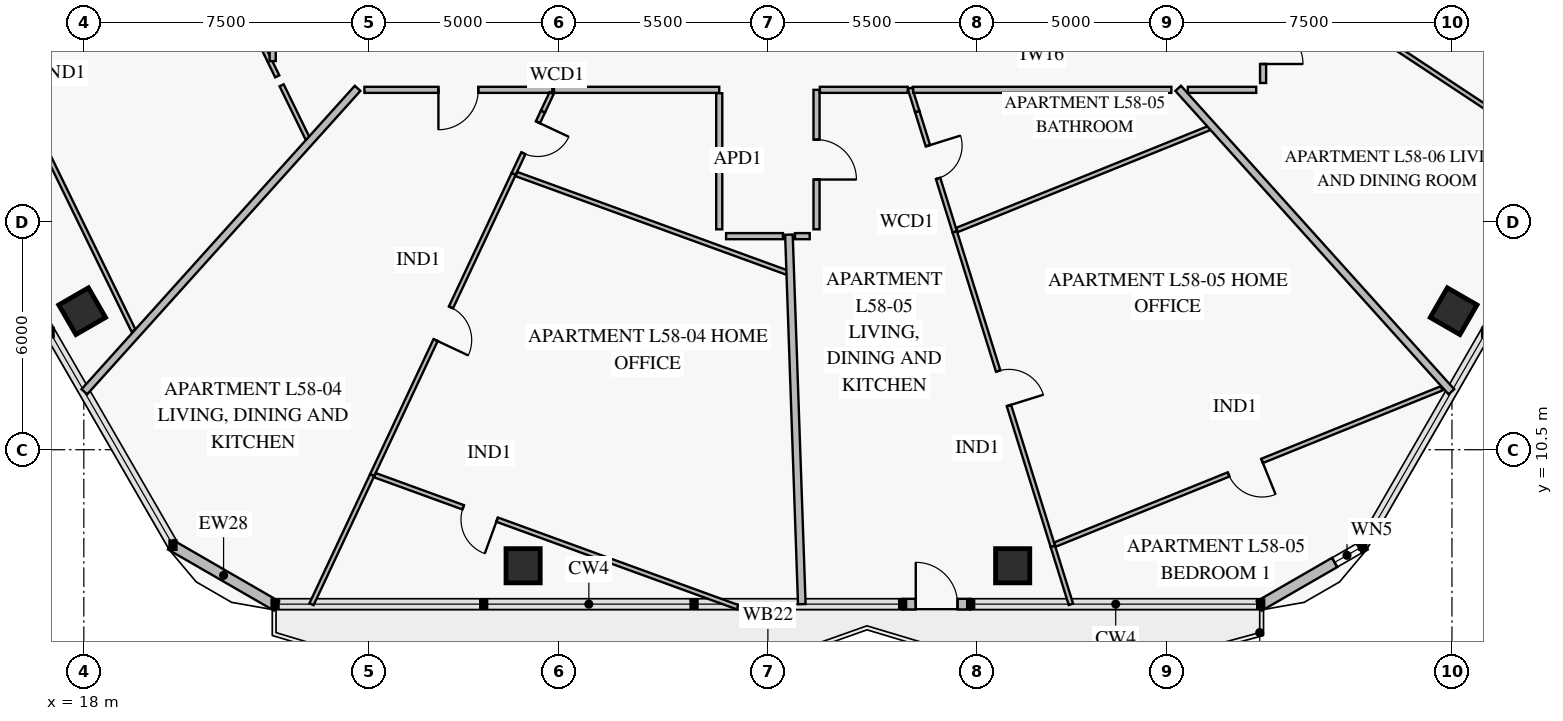
"""IFC4 building model, lengths in metres.
Left out: names, types, materials, properties, quantities, classifications, styles, units other than length and angle.
Written with IfcOpenShell. Run it as: python <this file> out.ifc"""

import sys

from ifc_helpers import new_model, si_unit, direction, frame, frame_2d, origin, origin_2d, place, context, subcontext, project, spatial, rectangle, extrude, element, fill, save


model = new_model("IFC4")
c1 = context("Model", 3, precision=1e-05, world=origin(), true_north=direction((0.0, 1.0)))
c2 = subcontext(c1, "Body", "Model", "MODEL_VIEW")
j1 = project(units=[si_unit("LENGTHUNIT", "METRE"), si_unit("PLANEANGLEUNIT", "RADIAN")], contexts=[c1])
p1 = place(None, origin())
s1 = spatial("IfcSite", under=j1, at=p1, CompositionType="ELEMENT")
p2 = place(p1, origin())
s2 = spatial("IfcBuilding", under=s1, at=p2, CompositionType="ELEMENT")
p3 = place(p2, frame((0.0, 0.0, 231.2)))
s3 = spatial("IfcBuildingStorey", under=s2, at=p3, CompositionType="ELEMENT", Elevation=231.2)
for number, where, z_axis, x_axis in (
    (1, (17.956, 14.145, 0.0), (0.0, 0.0, 1.0), (0.5, -0.866, 0.0)),
    (2, (29.559, 7.446, 0.0), (0.0, 0.0, 1.0), (1.0, 0.0, 0.0)),
    (3, (42.441, 7.446, 0.0), (0.0, 0.0, 1.0), (1.0, 0.0, 0.0)),
    (4, (54.044, 14.145, 0.0), (0.0, 0.0, 1.0), (0.5, 0.866, 0.0)),
):
    element("IfcColumn", number, at=place(p3, frame(where, z_axis=z_axis, x_axis=x_axis)), inside=s3, PredefinedType="COLUMN", context=c2, shape_type="SweptSolid", body=[
        extrude(rectangle(XDim=0.9, YDim=0.9, at=origin_2d()), origin(), (0.0, 0.0, 1.0), 3.55),
    ])
p4 = place(p3, frame((51.715, 7.996, 0.0), z_axis=(0.0, 0.0, 1.0), x_axis=(-0.866028773314, -0.499994163758, 0.0)))
e5 = element("IfcWall", 5, at=p4, inside=s3, PredefinedType="SOLIDWALL", context=c2, shape_type="SweptSolid", body=[
    extrude(rectangle(XDim=3.215, YDim=0.28, at=frame_2d((1.607, 0.0))), origin(), (0.0, 0.0, 1.0), 3.55),
])
p5 = place(p4, frame((0.176, 0.0, 0.85)))
e6 = element("IfcOpeningElement", 6, at=p5, cuts=e5, PredefinedType="OPENING", context=c2, shape_type="SweptSolid", body=[
    extrude(rectangle(XDim=0.75, YDim=1.5, at=frame_2d((0.375, 0.75))), frame((0.0, 0.152, 0.0), z_axis=(0.0, -1.0, 0.0), x_axis=(1.0, 0.0, 0.0)), (0.0, 0.0, 1.0), 0.304),
])
p6 = place(p3, frame((41.336, 6.436, 0.0), z_axis=(0.0, 0.0, 1.0), x_axis=(-1.0, 0.0, 0.0)))
e7 = element("IfcWall", 7, at=p6, inside=s3, PredefinedType="SOLIDWALL", context=c2, shape_type="SweptSolid", body=[
    extrude(rectangle(XDim=1.79, YDim=0.28, at=frame_2d((0.895, 0.0))), origin(), (0.0, 0.0, 1.0), 3.55),
])
p7 = place(p6, frame((0.345, 0.0, 0.0)))
e8 = element("IfcOpeningElement", 8, at=p7, cuts=e7, PredefinedType="OPENING", context=c2, shape_type="SweptSolid", body=[
    extrude(rectangle(XDim=1.1, YDim=2.2, at=frame_2d((0.55, 1.1))), frame((0.0, 0.152, 0.0), z_axis=(0.0, -1.0, 0.0), x_axis=(1.0, 0.0, 0.0)), (0.0, 0.0, 1.0), 0.304),
])
p8 = place(p3, frame((23.07, 6.389, 0.0), z_axis=(0.0, 0.0, 1.0), x_axis=(-0.866028773314, 0.499994163758, 0.0)))
e9 = element("IfcWall", 9, at=p8, inside=s3, PredefinedType="SOLIDWALL", context=c2, shape_type="SweptSolid", body=[
    extrude(rectangle(XDim=3.215, YDim=0.28, at=frame_2d((1.607, 0.0))), origin(), (0.0, 0.0, 1.0), 3.55),
])
p9 = place(p3, frame((14.396, 23.703, 0.0), z_axis=(0.0, 0.0, 1.0), x_axis=(0.438369959887, -0.898794625189, 0.0)))
e10 = element("IfcWall", 10, at=p9, inside=s3, PredefinedType="PARTITIONING", context=c2, shape_type="SweptSolid", body=[
    extrude(rectangle(XDim=11.203, YDim=0.12, at=frame_2d((5.601, 0.0))), origin(), (0.0, 0.0, 1.0), 2.95),
])
p10 = place(p9, frame((5.042, 0.0, 0.0)))
e11 = element("IfcOpeningElement", 11, at=p10, cuts=e10, PredefinedType="OPENING", context=c2, shape_type="SweptSolid", body=[
    extrude(rectangle(XDim=0.95, YDim=2.1, at=frame_2d((0.475, 1.05))), frame((0.0, 0.072, 0.0), z_axis=(0.0, -1.0, 0.0), x_axis=(1.0, 0.0, 0.0)), (0.0, 0.0, 1.0), 0.144),
])
p11 = place(p3, frame((30.082, 19.4, 0.0), z_axis=(0.0, 0.0, 1.0), x_axis=(-0.425163142446, -0.905116734077, 0.0)))
e12 = element("IfcWall", 12, at=p11, inside=s3, PredefinedType="PARTITIONING", context=c2, shape_type="SweptSolid", body=[
    extrude(rectangle(XDim=1.818, YDim=0.12, at=frame_2d((0.909, 0.0))), origin(), (0.0, 0.0, 1.0), 3.55),
])
p12 = place(p11, frame((0.314, 0.0, 0.0)))
e13 = element("IfcOpeningElement", 13, at=p12, cuts=e12, PredefinedType="OPENING", context=c2, shape_type="SweptSolid", body=[
    extrude(rectangle(XDim=0.9, YDim=2.1, at=frame_2d((0.45, 1.05))), frame((0.0, 0.072, 0.0), z_axis=(0.0, -1.0, 0.0), x_axis=(1.0, 0.0, 0.0)), (0.0, 0.0, 1.0), 0.144),
])
p13 = place(p3, frame((29.309, 17.754, 0.0), z_axis=(0.0, 0.0, 1.0), x_axis=(-0.425138894448, -0.905128123763, 0.0)))
e14 = element("IfcWall", 14, at=p13, inside=s3, PredefinedType="PARTITIONING", context=c2, shape_type="SweptSolid", body=[
    extrude(rectangle(XDim=8.755, YDim=0.12, at=frame_2d((4.377, 0.0))), origin(), (0.0, 0.0, 1.0), 3.55),
])
p14 = place(p13, frame((3.877, 0.0, 0.0)))
e15 = element("IfcOpeningElement", 15, at=p14, cuts=e14, PredefinedType="OPENING", context=c2, shape_type="SweptSolid", body=[
    extrude(rectangle(XDim=0.95, YDim=2.1, at=frame_2d((0.475, 1.05))), frame((0.0, 0.072, 0.0), z_axis=(0.0, -1.0, 0.0), x_axis=(1.0, 0.0, 0.0)), (0.0, 0.0, 1.0), 0.144),
])
p15 = place(p3, frame((25.661, 9.829, 0.0), z_axis=(0.0, 0.0, 1.0), x_axis=(0.939695099279, -0.342013333644, 0.0)))
e16 = element("IfcWall", 16, at=p15, inside=s3, PredefinedType="PARTITIONING", context=c2, shape_type="SweptSolid", body=[
    extrude(rectangle(XDim=10.154, YDim=0.12, at=frame_2d((5.077, 0.0))), origin(), (0.0, 0.0, 1.0), 2.93),
])
p16 = place(p15, frame((2.47, 0.0, 0.0)))
e17 = element("IfcOpeningElement", 17, at=p16, cuts=e16, PredefinedType="OPENING", context=c2, shape_type="SweptSolid", body=[
    extrude(rectangle(XDim=0.95, YDim=2.1, at=frame_2d((0.475, 1.05))), frame((0.0, 0.072, 0.0), z_axis=(0.0, -1.0, 0.0), x_axis=(1.0, 0.0, 0.0)), (0.0, 0.0, 1.0), 0.144),
])
p17 = place(p3, frame((25.384, 19.97, 0.0), z_axis=(0.0, 0.0, 1.0), x_axis=(1.0, 0.0, 0.0)))
e18 = element("IfcWall", 18, at=p17, inside=s3, PredefinedType="PARTITIONING", context=c2, shape_type="SweptSolid", body=[
    extrude(rectangle(XDim=4.944, YDim=0.16, at=frame_2d((2.472, 0.0))), origin(), (0.0, 0.0, 1.0), 3.55),
])
p18 = place(p17, frame((1.947, 0.0, 0.0)))
e19 = element("IfcOpeningElement", 19, at=p18, cuts=e18, PredefinedType="OPENING", context=c2, shape_type="SweptSolid", body=[
    extrude(rectangle(XDim=1.05, YDim=2.15, at=frame_2d((0.525, 1.075))), frame((0.0, 0.092, 0.0), z_axis=(0.0, -1.0, 0.0), x_axis=(1.0, 0.0, 0.0)), (0.0, 0.0, 1.0), 0.184),
])
p19 = place(p3, frame((39.929, 19.4, 0.0), z_axis=(0.0, 0.0, 1.0), x_axis=(0.297738747335, -0.954647389529, 0.0)))
e20 = element("IfcWall", 20, at=p19, inside=s3, PredefinedType="PARTITIONING", context=c2, shape_type="SweptSolid", body=[
    extrude(rectangle(XDim=3.318, YDim=0.12, at=frame_2d((1.659, 0.0))), origin(), (0.0, 0.0, 1.0), 3.55),
])
p20 = place(p19, frame((0.944, 0.0, 0.0)))
e21 = element("IfcOpeningElement", 21, at=p20, cuts=e20, PredefinedType="OPENING", context=c2, shape_type="SweptSolid", body=[
    extrude(rectangle(XDim=0.9, YDim=2.1, at=frame_2d((0.45, 1.05))), frame((0.0, 0.072, 0.0), z_axis=(0.0, -1.0, 0.0), x_axis=(1.0, 0.0, 0.0)), (0.0, 0.0, 1.0), 0.144),
])
p21 = place(p3, frame((40.917, 16.232, 0.0), z_axis=(0.0, 0.0, 1.0), x_axis=(0.297710586005, -0.954656172127, 0.0)))
e22 = element("IfcWall", 22, at=p21, inside=s3, PredefinedType="PARTITIONING", context=c2, shape_type="SweptSolid", body=[
    extrude(rectangle(XDim=8.67, YDim=0.12, at=frame_2d((4.335, 0.0))), origin(), (0.0, 0.0, 1.0), 2.93),
])
p22 = place(p21, frame((3.835, 0.0, 0.0)))
e23 = element("IfcOpeningElement", 23, at=p22, cuts=e22, PredefinedType="OPENING", context=c2, shape_type="SweptSolid", body=[
    extrude(rectangle(XDim=0.95, YDim=2.1, at=frame_2d((0.475, 1.05))), frame((0.0, 0.072, 0.0), z_axis=(0.0, -1.0, 0.0), x_axis=(1.0, 0.0, 0.0)), (0.0, 0.0, 1.0), 0.144),
])
p23 = place(p3, frame((43.554, 8.004, 0.0), z_axis=(0.0, 0.0, 1.0), x_axis=(0.927183582348, 0.374607267179, 0.0)))
e24 = element("IfcWall", 24, at=p23, inside=s3, PredefinedType="PARTITIONING", context=c2, shape_type="SweptSolid", body=[
    extrude(rectangle(XDim=10.972, YDim=0.12, at=frame_2d((5.486, 0.0))), origin(), (0.0, 0.0, 1.0), 2.93),
])
p24 = place(p23, frame((4.927, 0.0, 0.0)))
e25 = element("IfcOpeningElement", 25, at=p24, cuts=e24, PredefinedType="OPENING", context=c2, shape_type="SweptSolid", body=[
    extrude(rectangle(XDim=0.95, YDim=2.1, at=frame_2d((0.475, 1.05))), frame((0.0, 0.072, 0.0), z_axis=(0.0, -1.0, 0.0), x_axis=(1.0, 0.0, 0.0)), (0.0, 0.0, 1.0), 0.144),
])
p25 = place(p3, frame((37.28, 16.3, 0.0), z_axis=(0.0, 0.0, 1.0), x_axis=(0.0, 1.0, 0.0)))
e26 = element("IfcWall", 26, at=p25, inside=s3, PredefinedType="PARTITIONING", context=c2, shape_type="SweptSolid", body=[
    extrude(rectangle(XDim=3.67, YDim=0.16, at=frame_2d((1.835, 0.0))), origin(), (0.0, 0.0, 1.0), 3.55),
])
p26 = place(p25, frame((1.31, 0.0, 0.0)))
e27 = element("IfcOpeningElement", 27, at=p26, cuts=e26, PredefinedType="OPENING", context=c2, shape_type="SweptSolid", body=[
    extrude(rectangle(XDim=1.05, YDim=2.15, at=frame_2d((0.525, 1.075))), frame((0.0, 0.092, 0.0), z_axis=(0.0, -1.0, 0.0), x_axis=(1.0, 0.0, 0.0)), (0.0, 0.0, 1.0), 0.184),
])
p27 = place(p3, frame((49.03, 20.151, 0.0), z_axis=(0.0, 0.0, 1.0), x_axis=(0.0, 1.0, 0.0)))
e28 = element("IfcWall", 28, at=p27, inside=s3, PredefinedType="PARTITIONING", context=c2, shape_type="SweptSolid", body=[
    extrude(rectangle(XDim=2.049, YDim=0.16, at=frame_2d((1.024, 0.0))), origin(), (0.0, 0.0, 1.0), 3.55),
])
p28 = place(p27, frame((0.499, 0.0, 0.0)))
e29 = element("IfcOpeningElement", 29, at=p28, cuts=e28, PredefinedType="OPENING", context=c2, shape_type="SweptSolid", body=[
    extrude(rectangle(XDim=1.05, YDim=2.15, at=frame_2d((0.525, 1.075))), frame((0.0, 0.092, 0.0), z_axis=(0.0, -1.0, 0.0), x_axis=(1.0, 0.0, 0.0)), (0.0, 0.0, 1.0), 0.184),
])
p29 = place(p3, frame((20.339, 25.966, 0.0), z_axis=(0.0, 0.0, 1.0), x_axis=(0.438368444203, -0.898795364433, 0.0)))
e30 = element("IfcWall", 30, at=p29, inside=s3, PredefinedType="PARTITIONING", context=c2, shape_type="SweptSolid", body=[
    extrude(rectangle(XDim=6.275, YDim=0.12, at=frame_2d((3.138, 0.0))), origin(), (0.0, 0.0, 1.0), 3.55),
])
p30 = place(p3, frame((23.205, 20.09, 0.0), z_axis=(0.0, 0.0, 1.0), x_axis=(0.43839655559, -0.898781653154, 0.0)))
e31 = element("IfcWall", 31, at=p30, inside=s3, PredefinedType="PARTITIONING", context=c2, shape_type="SweptSolid", body=[
    extrude(rectangle(XDim=1.599, YDim=0.12, at=frame_2d((0.799, 0.0))), origin(), (0.0, 0.0, 1.0), 2.95),
])
p31 = place(p3, frame((25.204, 20.01, 0.0), z_axis=(0.0, 0.0, 1.0), x_axis=(-0.669124143022, -0.743150645041, 0.0)))
e32 = element("IfcWall", 32, at=p31, inside=s3, PredefinedType="PARTITIONING", context=c2, shape_type="SweptSolid", body=[
    extrude(rectangle(XDim=10.745, YDim=0.2, at=frame_2d((5.373, 0.0))), origin(), (0.0, 0.0, 1.0), 2.93),
])
p32 = place(p3, frame((30.308, 19.882, 0.0), z_axis=(0.0, 0.0, 1.0), x_axis=(-0.425267300576, -0.905067800256, 0.0)))
e33 = element("IfcWall", 33, at=p32, inside=s3, PredefinedType="PARTITIONING", context=c2, shape_type="SweptSolid", body=[
    extrude(rectangle(XDim=0.533, YDim=0.12, at=frame_2d((0.266, 0.0))), origin(), (0.0, 0.0, 1.0), 3.55),
])
p33 = place(p3, frame((25.586, 9.83, 0.0), z_axis=(0.0, 0.0, 1.0), x_axis=(-0.425163933355, -0.90511636256, 0.0)))
e34 = element("IfcWall", 34, at=p33, inside=s3, PredefinedType="PARTITIONING", context=c2, shape_type="SweptSolid", body=[
    extrude(rectangle(XDim=3.752, YDim=0.12, at=frame_2d((1.876, 0.0))), origin(), (0.0, 0.0, 1.0), 2.93),
])
p34 = place(p3, frame((29.383, 17.754, 0.0), z_axis=(0.0, 0.0, 1.0), x_axis=(0.939684825918, -0.342041558791, 0.0)))
e35 = element("IfcWall", 35, at=p34, inside=s3, PredefinedType="PARTITIONING", context=c2, shape_type="SweptSolid", body=[
    extrude(rectangle(XDim=7.617, YDim=0.12, at=frame_2d((3.809, 0.0))), origin(), (0.0, 0.0, 1.0), 2.95),
])
p35 = place(p3, frame((36.553, 16.16, 0.0), z_axis=(0.0, 0.0, 1.0), x_axis=(0.034903897424, -0.999390673333, 0.0)))
e36 = element("IfcWall", 36, at=p35, inside=s3, PredefinedType="PARTITIONING", context=c2, shape_type="SweptSolid", body=[
    extrude(rectangle(XDim=9.729, YDim=0.2, at=frame_2d((4.865, 0.0))), origin(), (0.0, 0.0, 1.0), 2.93),
])
p36 = place(p3, frame((39.738, 20.014, 0.0), z_axis=(0.0, 0.0, 1.0), x_axis=(0.297604881779, -0.954689129686, 0.0)))
e37 = element("IfcWall", 37, at=p36, inside=s3, PredefinedType="PARTITIONING", context=c2, shape_type="SweptSolid", body=[
    extrude(rectangle(XDim=0.643, YDim=0.12, at=frame_2d((0.322, 0.0))), origin(), (0.0, 0.0, 1.0), 3.55),
])
p37 = place(p3, frame((43.499, 7.955, 0.0), z_axis=(0.0, 0.0, 1.0), x_axis=(0.297621462393, -0.95468396086, 0.0)))
e38 = element("IfcWall", 38, at=p37, inside=s3, PredefinedType="PARTITIONING", context=c2, shape_type="SweptSolid", body=[
    extrude(rectangle(XDim=1.595, YDim=0.12, at=frame_2d((0.798, 0.0))), origin(), (0.0, 0.0, 1.0), 3.55),
])
p38 = place(p3, frame((40.973, 16.281, 0.0), z_axis=(0.0, 0.0, 1.0), x_axis=(0.927185708854, 0.374602003862, 0.0)))
e39 = element("IfcWall", 39, at=p38, inside=s3, PredefinedType="PARTITIONING", context=c2, shape_type="SweptSolid", body=[
    extrude(rectangle(XDim=7.204, YDim=0.12, at=frame_2d((3.602, 0.0))), origin(), (0.0, 0.0, 1.0), 3.55),
])
p39 = place(p3, frame((46.796, 20.01, 0.0), z_axis=(0.0, 0.0, 1.0), x_axis=(0.669124143022, -0.743150645041, 0.0)))
e40 = element("IfcWall", 40, at=p39, inside=s3, PredefinedType="PARTITIONING", context=c2, shape_type="SweptSolid", body=[
    extrude(rectangle(XDim=10.745, YDim=0.2, at=frame_2d((5.373, 0.0))), origin(), (0.0, 0.0, 1.0), 2.93),
])
p40 = place(p3, frame((49.671, 22.965, 0.0), z_axis=(0.0, 0.0, 1.0), x_axis=(0.834276896683, -0.551345680731, 0.0)))
e41 = element("IfcWall", 41, at=p40, inside=s3, PredefinedType="PARTITIONING", context=c2, shape_type="SweptSolid", body=[
    extrude(rectangle(XDim=9.233, YDim=0.12, at=frame_2d((4.616, 0.0))), origin(), (0.0, 0.0, 1.0), 2.93),
])
p41 = place(p3, frame((22.97, 26.967, 0.0), z_axis=(0.0, 0.0, 1.0), x_axis=(0.0, -1.0, 0.0)))
e42 = element("IfcWall", 42, at=p41, inside=s3, PredefinedType="PARTITIONING", context=c2, shape_type="SweptSolid", body=[
    extrude(rectangle(XDim=6.241, YDim=0.16, at=frame_2d((3.121, 0.0))), origin(), (0.0, 0.0, 1.0), 3.55),
])
p42 = place(p3, frame((30.372, 19.97, 0.0), z_axis=(0.0, 0.0, 1.0), x_axis=(1.0, 0.0, 0.0)))
e43 = element("IfcWall", 43, at=p42, inside=s3, PredefinedType="PARTITIONING", context=c2, shape_type="SweptSolid", body=[
    extrude(rectangle(XDim=4.348, YDim=0.16, at=frame_2d((2.174, 0.0))), origin(), (0.0, 0.0, 1.0), 2.95),
])
p43 = place(p3, frame((34.72, 19.882, 0.0), z_axis=(0.0, 0.0, 1.0), x_axis=(0.0, -1.0, 0.0)))
e44 = element("IfcWall", 44, at=p43, inside=s3, PredefinedType="PARTITIONING", context=c2, shape_type="SweptSolid", body=[
    extrude(rectangle(XDim=3.582, YDim=0.16, at=frame_2d((1.791, 0.0))), origin(), (0.0, 0.0, 1.0), 3.55),
])
p44 = place(p3, frame((34.9, 16.12, 0.0), z_axis=(0.0, 0.0, 1.0), x_axis=(1.0, 0.0, 0.0)))
e45 = element("IfcWall", 45, at=p44, inside=s3, PredefinedType="PARTITIONING", context=c2, shape_type="SweptSolid", body=[
    extrude(rectangle(XDim=1.496, YDim=0.16, at=frame_2d((0.748, 0.0))), origin(), (0.0, 0.0, 1.0), 3.55),
])
p45 = place(p3, frame((37.368, 19.97, 0.0), z_axis=(0.0, 0.0, 1.0), x_axis=(1.0, 0.0, 0.0)))
e46 = element("IfcWall", 46, at=p45, inside=s3, PredefinedType="PARTITIONING", context=c2, shape_type="SweptSolid", body=[
    extrude(rectangle(XDim=2.312, YDim=0.16, at=frame_2d((1.156, 0.0))), origin(), (0.0, 0.0, 1.0), 2.95),
])
p46 = place(p3, frame((36.713, 16.12, 0.0), z_axis=(0.0, 0.0, 1.0), x_axis=(1.0, 0.0, 0.0)))
e47 = element("IfcWall", 47, at=p46, inside=s3, PredefinedType="PARTITIONING", context=c2, shape_type="SweptSolid", body=[
    extrude(rectangle(XDim=0.387, YDim=0.16, at=frame_2d((0.193, 0.0))), origin(), (0.0, 0.0, 1.0), 3.55),
])
p47 = place(p3, frame((39.823, 19.97, 0.0), z_axis=(0.0, 0.0, 1.0), x_axis=(1.0, 0.0, 0.0)))
e48 = element("IfcWall", 48, at=p47, inside=s3, PredefinedType="PARTITIONING", context=c2, shape_type="SweptSolid", body=[
    extrude(rectangle(XDim=6.794, YDim=0.16, at=frame_2d((3.397, 0.0))), origin(), (0.0, 0.0, 1.0), 3.55),
])
p48 = place(p3, frame((47.051, 19.97, 0.0), z_axis=(0.0, 0.0, 1.0), x_axis=(1.0, 0.0, 0.0)))
e49 = element("IfcWall", 49, at=p48, inside=s3, PredefinedType="PARTITIONING", context=c2, shape_type="SweptSolid", body=[
    extrude(rectangle(XDim=1.799, YDim=0.16, at=frame_2d((0.899, 0.0))), origin(), (0.0, 0.0, 1.0), 2.95),
])
p49 = place(p5, origin())
e50 = element("IfcWindow", 50, at=p49, inside=s3, PartitioningType="SINGLE_PANEL", PredefinedType="WINDOW", context=c2, shape_type="SweptSolid", body=[
    extrude(rectangle(XDim=0.75, YDim=1.5, at=frame_2d((0.375, 0.75))), frame((0.0, 0.03, 0.0), z_axis=(0.0, -1.0, 0.0), x_axis=(1.0, 0.0, 0.0)), (0.0, 0.0, 1.0), 0.06),
])
fill(e6, e50)
p50 = place(p7, frame((1.1, 0.0, 0.0), z_axis=(0.0, 0.0, 1.0), x_axis=(-1.0, 0.0, 0.0)))
e51 = element("IfcDoor", 51, at=p50, inside=s3, OperationType="SINGLE_SWING_LEFT", PredefinedType="DOOR", context=c2, shape_type="SweptSolid", body=[
    extrude(rectangle(XDim=1.1, YDim=2.2, at=frame_2d((0.55, 1.1))), frame((0.0, 0.025, 0.0), z_axis=(0.0, -1.0, 0.0), x_axis=(1.0, 0.0, 0.0)), (0.0, 0.0, 1.0), 0.05),
])
fill(e8, e51)
p51 = place(p12, origin())
e52 = element("IfcDoor", 52, at=p51, inside=s3, OperationType="SINGLE_SWING_LEFT", PredefinedType="DOOR", context=c2, shape_type="SweptSolid", body=[
    extrude(rectangle(XDim=0.9, YDim=2.1, at=frame_2d((0.45, 1.05))), frame((0.0, 0.025, 0.0), z_axis=(0.0, -1.0, 0.0), x_axis=(1.0, 0.0, 0.0)), (0.0, 0.0, 1.0), 0.05),
])
fill(e13, e52)
p52 = place(p14, origin())
e53 = element("IfcDoor", 53, at=p52, inside=s3, OperationType="SINGLE_SWING_RIGHT", PredefinedType="DOOR", context=c2, shape_type="SweptSolid", body=[
    extrude(rectangle(XDim=0.95, YDim=2.1, at=frame_2d((0.475, 1.05))), frame((0.0, 0.025, 0.0), z_axis=(0.0, -1.0, 0.0), x_axis=(1.0, 0.0, 0.0)), (0.0, 0.0, 1.0), 0.05),
])
fill(e15, e53)
p53 = place(p16, frame((0.95, 0.0, 0.0), z_axis=(0.0, 0.0, 1.0), x_axis=(-1.0, 0.0, 0.0)))
e54 = element("IfcDoor", 54, at=p53, inside=s3, OperationType="SINGLE_SWING_LEFT", PredefinedType="DOOR", context=c2, shape_type="SweptSolid", body=[
    extrude(rectangle(XDim=0.95, YDim=2.1, at=frame_2d((0.475, 1.05))), frame((0.0, 0.025, 0.0), z_axis=(0.0, -1.0, 0.0), x_axis=(1.0, 0.0, 0.0)), (0.0, 0.0, 1.0), 0.05),
])
fill(e17, e54)
p54 = place(p18, frame((1.05, 0.0, 0.0), z_axis=(0.0, 0.0, 1.0), x_axis=(-1.0, 0.0, 0.0)))
e55 = element("IfcDoor", 55, at=p54, inside=s3, OperationType="SINGLE_SWING_RIGHT", PredefinedType="DOOR", context=c2, shape_type="SweptSolid", body=[
    extrude(rectangle(XDim=1.05, YDim=2.15, at=frame_2d((0.525, 1.075))), frame((0.0, 0.025, 0.0), z_axis=(0.0, -1.0, 0.0), x_axis=(1.0, 0.0, 0.0)), (0.0, 0.0, 1.0), 0.05),
])
fill(e19, e55)
p55 = place(p20, origin())
e56 = element("IfcDoor", 56, at=p55, inside=s3, OperationType="SINGLE_SWING_LEFT", PredefinedType="DOOR", context=c2, shape_type="SweptSolid", body=[
    extrude(rectangle(XDim=0.9, YDim=2.1, at=frame_2d((0.45, 1.05))), frame((0.0, 0.025, 0.0), z_axis=(0.0, -1.0, 0.0), x_axis=(1.0, 0.0, 0.0)), (0.0, 0.0, 1.0), 0.05),
])
fill(e21, e56)
p56 = place(p22, origin())
e57 = element("IfcDoor", 57, at=p56, inside=s3, OperationType="SINGLE_SWING_RIGHT", PredefinedType="DOOR", context=c2, shape_type="SweptSolid", body=[
    extrude(rectangle(XDim=0.95, YDim=2.1, at=frame_2d((0.475, 1.05))), frame((0.0, 0.025, 0.0), z_axis=(0.0, -1.0, 0.0), x_axis=(1.0, 0.0, 0.0)), (0.0, 0.0, 1.0), 0.05),
])
fill(e23, e57)
p57 = place(p24, frame((0.95, 0.0, 0.0), z_axis=(0.0, 0.0, 1.0), x_axis=(-1.0, 0.0, 0.0)))
e58 = element("IfcDoor", 58, at=p57, inside=s3, OperationType="SINGLE_SWING_LEFT", PredefinedType="DOOR", context=c2, shape_type="SweptSolid", body=[
    extrude(rectangle(XDim=0.95, YDim=2.1, at=frame_2d((0.475, 1.05))), frame((0.0, 0.025, 0.0), z_axis=(0.0, -1.0, 0.0), x_axis=(1.0, 0.0, 0.0)), (0.0, 0.0, 1.0), 0.05),
])
fill(e25, e58)
p58 = place(p26, frame((1.05, 0.0, 0.0), z_axis=(0.0, 0.0, 1.0), x_axis=(-1.0, 0.0, 0.0)))
e59 = element("IfcDoor", 59, at=p58, inside=s3, OperationType="SINGLE_SWING_RIGHT", PredefinedType="DOOR", context=c2, shape_type="SweptSolid", body=[
    extrude(rectangle(XDim=1.05, YDim=2.15, at=frame_2d((0.525, 1.075))), frame((0.0, 0.025, 0.0), z_axis=(0.0, -1.0, 0.0), x_axis=(1.0, 0.0, 0.0)), (0.0, 0.0, 1.0), 0.05),
])
fill(e27, e59)
p59 = place(p28, frame((1.05, 0.0, 0.0), z_axis=(0.0, 0.0, 1.0), x_axis=(-1.0, 0.0, 0.0)))
e60 = element("IfcDoor", 60, at=p59, inside=s3, OperationType="SINGLE_SWING_RIGHT", PredefinedType="DOOR", context=c2, shape_type="SweptSolid", body=[
    extrude(rectangle(XDim=1.05, YDim=2.15, at=frame_2d((0.525, 1.075))), frame((0.0, 0.025, 0.0), z_axis=(0.0, -1.0, 0.0), x_axis=(1.0, 0.0, 0.0)), (0.0, 0.0, 1.0), 0.05),
])
fill(e29, e60)
save(model, sys.argv[1])
